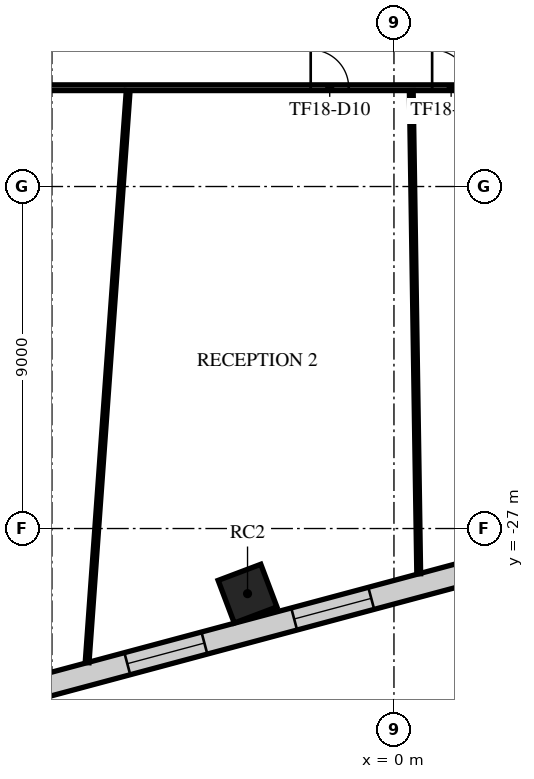
"""IFC4 building model, lengths in metres.
Left out: names, types, materials, properties, quantities, classifications, styles, units other than length and angle.
Written with IfcOpenShell. Run it as: python <this file> out.ifc"""

import sys

from ifc_helpers import new_model, si_unit, direction, frame, frame_2d, origin, origin_2d, place, context, subcontext, project, spatial, rectangle, extrude, element, fill, save


model = new_model("IFC4")
c1 = context("Model", 3, precision=1e-05, world=origin(), true_north=direction((0.0, 1.0)))
c2 = subcontext(c1, "Body", "Model", "MODEL_VIEW")
j1 = project(units=[si_unit("LENGTHUNIT", "METRE"), si_unit("PLANEANGLEUNIT", "RADIAN")], contexts=[c1])
p1 = place(None, origin())
s1 = spatial("IfcSite", under=j1, at=p1, CompositionType="ELEMENT")
p2 = place(p1, origin())
s2 = spatial("IfcBuilding", under=s1, at=p2, CompositionType="ELEMENT")
p3 = place(p2, frame((0.0, 0.0, 82.1)))
s3 = spatial("IfcBuildingStorey", under=s2, at=p3, CompositionType="ELEMENT", Elevation=82.1)
p4 = place(p3, frame((-3.853, -28.714, -0.42), z_axis=(0.0, 0.0, 1.0), x_axis=(0.935491525991, 0.353349125935, 0.0)))
e1 = element("IfcColumn", 1, at=p4, inside=s3, PredefinedType="COLUMN", context=c2, shape_type="SweptSolid", body=[
    extrude(rectangle(XDim=1.2, YDim=1.2, at=origin_2d()), origin(), (0.0, 0.0, 1.0), 4.42),
])
p5 = place(p3, frame((-16.859, -33.195, 0.0), z_axis=(0.0, 0.0, 1.0), x_axis=(0.965925643605, 0.258819726887, 0.0)))
e2 = element("IfcWall", 2, at=p5, inside=s3, PredefinedType="STANDARD", context=c2, shape_type="SweptSolid", body=[
    extrude(rectangle(XDim=49.752, YDim=0.6, at=frame_2d((24.876, 0.0))), origin(), (0.0, 0.0, 1.0), 3.58),
])
p6 = place(p5, frame((1.161, 0.0, 0.9)))
e3 = element("IfcOpeningElement", 3, at=p6, cuts=e2, PredefinedType="OPENING", context=c2, shape_type="SweptSolid", body=[
    extrude(rectangle(XDim=2.1, YDim=2.1, at=frame_2d((1.05, 1.05))), frame((0.0, 0.31, 0.0), z_axis=(0.0, -1.0, 0.0), x_axis=(1.0, 0.0, 0.0)), (0.0, 0.0, 1.0), 0.62),
])
p7 = place(p5, frame((5.644, 0.0, 0.9)))
e4 = element("IfcOpeningElement", 4, at=p7, cuts=e2, PredefinedType="OPENING", context=c2, shape_type="SweptSolid", body=[
    extrude(rectangle(XDim=2.1, YDim=2.1, at=frame_2d((1.05, 1.05))), frame((0.0, 0.31, 0.0), z_axis=(0.0, -1.0, 0.0), x_axis=(1.0, 0.0, 0.0)), (0.0, 0.0, 1.0), 0.62),
])
p8 = place(p5, frame((10.189, 0.0, 0.9)))
e5 = element("IfcOpeningElement", 5, at=p8, cuts=e2, PredefinedType="OPENING", context=c2, shape_type="SweptSolid", body=[
    extrude(rectangle(XDim=2.1, YDim=2.1, at=frame_2d((1.05, 1.05))), frame((0.0, 0.31, 0.0), z_axis=(0.0, -1.0, 0.0), x_axis=(1.0, 0.0, 0.0)), (0.0, 0.0, 1.0), 0.62),
])
p9 = place(p5, frame((14.735, 0.0, 0.9)))
e6 = element("IfcOpeningElement", 6, at=p9, cuts=e2, PredefinedType="OPENING", context=c2, shape_type="SweptSolid", body=[
    extrude(rectangle(XDim=2.1, YDim=2.1, at=frame_2d((1.05, 1.05))), frame((0.0, 0.31, 0.0), z_axis=(0.0, -1.0, 0.0), x_axis=(1.0, 0.0, 0.0)), (0.0, 0.0, 1.0), 0.62),
])
p10 = place(p5, frame((19.28, 0.0, 0.9)))
e7 = element("IfcOpeningElement", 7, at=p10, cuts=e2, PredefinedType="OPENING", context=c2, shape_type="SweptSolid", body=[
    extrude(rectangle(XDim=2.1, YDim=2.1, at=frame_2d((1.05, 1.05))), frame((0.0, 0.31, 0.0), z_axis=(0.0, -1.0, 0.0), x_axis=(1.0, 0.0, 0.0)), (0.0, 0.0, 1.0), 0.62),
])
p11 = place(p5, frame((23.826, 0.0, 0.9)))
e8 = element("IfcOpeningElement", 8, at=p11, cuts=e2, PredefinedType="OPENING", context=c2, shape_type="SweptSolid", body=[
    extrude(rectangle(XDim=2.1, YDim=2.1, at=frame_2d((1.05, 1.05))), frame((0.0, 0.31, 0.0), z_axis=(0.0, -1.0, 0.0), x_axis=(1.0, 0.0, 0.0)), (0.0, 0.0, 1.0), 0.62),
])
p12 = place(p5, frame((28.371, 0.0, 0.9)))
e9 = element("IfcOpeningElement", 9, at=p12, cuts=e2, PredefinedType="OPENING", context=c2, shape_type="SweptSolid", body=[
    extrude(rectangle(XDim=2.1, YDim=2.1, at=frame_2d((1.05, 1.05))), frame((0.0, 0.31, 0.0), z_axis=(0.0, -1.0, 0.0), x_axis=(1.0, 0.0, 0.0)), (0.0, 0.0, 1.0), 0.62),
])
p13 = place(p5, frame((32.917, 0.0, 0.9)))
e10 = element("IfcOpeningElement", 10, at=p13, cuts=e2, PredefinedType="OPENING", context=c2, shape_type="SweptSolid", body=[
    extrude(rectangle(XDim=2.1, YDim=2.1, at=frame_2d((1.05, 1.05))), frame((0.0, 0.31, 0.0), z_axis=(0.0, -1.0, 0.0), x_axis=(1.0, 0.0, 0.0)), (0.0, 0.0, 1.0), 0.62),
])
p14 = place(p5, frame((37.462, 0.0, 0.9)))
e11 = element("IfcOpeningElement", 11, at=p14, cuts=e2, PredefinedType="OPENING", context=c2, shape_type="SweptSolid", body=[
    extrude(rectangle(XDim=2.1, YDim=2.1, at=frame_2d((1.05, 1.05))), frame((0.0, 0.31, 0.0), z_axis=(0.0, -1.0, 0.0), x_axis=(1.0, 0.0, 0.0)), (0.0, 0.0, 1.0), 0.62),
])
p15 = place(p5, frame((42.008, 0.0, 0.9)))
e12 = element("IfcOpeningElement", 12, at=p15, cuts=e2, PredefinedType="OPENING", context=c2, shape_type="SweptSolid", body=[
    extrude(rectangle(XDim=2.1, YDim=2.1, at=frame_2d((1.05, 1.05))), frame((0.0, 0.31, 0.0), z_axis=(0.0, -1.0, 0.0), x_axis=(1.0, 0.0, 0.0)), (0.0, 0.0, 1.0), 0.62),
])
p16 = place(p5, frame((46.491, 0.0, 0.9)))
e13 = element("IfcOpeningElement", 13, at=p16, cuts=e2, PredefinedType="OPENING", context=c2, shape_type="SweptSolid", body=[
    extrude(rectangle(XDim=2.1, YDim=2.1, at=frame_2d((1.05, 1.05))), frame((0.0, 0.31, 0.0), z_axis=(0.0, -1.0, 0.0), x_axis=(1.0, 0.0, 0.0)), (0.0, 0.0, 1.0), 0.62),
])
p17 = place(p3, frame((-15.325, -15.4, 0.0), z_axis=(0.0, 0.0, 1.0), x_axis=(1.0, 0.0, 0.0)))
e14 = element("IfcWall", 14, at=p17, inside=s3, PredefinedType="PARTITIONING", context=c2, shape_type="SweptSolid", body=[
    extrude(rectangle(XDim=30.725, YDim=0.15, at=frame_2d((15.362, 0.0))), origin(), (0.0, 0.0, 1.0), 3.08),
])
p18 = place(p17, frame((1.8, 0.0, 0.0)))
e15 = element("IfcOpeningElement", 15, at=p18, cuts=e14, PredefinedType="OPENING", context=c2, shape_type="SweptSolid", body=[
    extrude(rectangle(XDim=1.8, YDim=2.1, at=frame_2d((0.9, 1.05))), frame((0.0, 0.085, 0.0), z_axis=(0.0, -1.0, 0.0), x_axis=(1.0, 0.0, 0.0)), (0.0, 0.0, 1.0), 0.17),
])
p19 = place(p17, frame((13.134, 0.0, 0.0)))
e16 = element("IfcOpeningElement", 16, at=p19, cuts=e14, PredefinedType="OPENING", context=c2, shape_type="SweptSolid", body=[
    extrude(rectangle(XDim=1.0, YDim=2.1, at=frame_2d((0.5, 1.05))), frame((0.0, 0.085, 0.0), z_axis=(0.0, -1.0, 0.0), x_axis=(1.0, 0.0, 0.0)), (0.0, 0.0, 1.0), 0.17),
])
p20 = place(p17, frame((16.329, 0.0, 0.0)))
e17 = element("IfcOpeningElement", 17, at=p20, cuts=e14, PredefinedType="OPENING", context=c2, shape_type="SweptSolid", body=[
    extrude(rectangle(XDim=1.0, YDim=2.1, at=frame_2d((0.5, 1.05))), frame((0.0, 0.085, 0.0), z_axis=(0.0, -1.0, 0.0), x_axis=(1.0, 0.0, 0.0)), (0.0, 0.0, 1.0), 0.17),
])
p21 = place(p17, frame((24.208, 0.0, 0.0)))
e18 = element("IfcOpeningElement", 18, at=p21, cuts=e14, PredefinedType="OPENING", context=c2, shape_type="SweptSolid", body=[
    extrude(rectangle(XDim=1.0, YDim=2.1, at=frame_2d((0.5, 1.05))), frame((0.0, 0.085, 0.0), z_axis=(0.0, -1.0, 0.0), x_axis=(1.0, 0.0, 0.0)), (0.0, 0.0, 1.0), 0.17),
])
p22 = place(p3, frame((-8.074, -30.528, 0.0), z_axis=(0.0, 0.0, 1.0), x_axis=(0.071616164184, 0.997432265885, 0.0)))
e19 = element("IfcWall", 19, at=p22, inside=s3, PredefinedType="PARTITIONING", context=c2, shape_type="SweptSolid", body=[
    extrude(rectangle(XDim=15.088, YDim=0.1, at=frame_2d((7.544, 0.0))), origin(), (0.0, 0.0, 1.0), 3.58),
])
p23 = place(p3, frame((0.455, -15.476, 0.0), z_axis=(0.0, 0.0, 1.0), x_axis=(0.015436837746, -0.999880844921, 0.0)))
e20 = element("IfcWall", 20, at=p23, inside=s3, PredefinedType="PARTITIONING", context=c2, shape_type="SweptSolid", body=[
    extrude(rectangle(XDim=12.716, YDim=0.1, at=frame_2d((6.358, 0.0))), origin(), (0.0, 0.0, 1.0), 3.58),
])
p24 = place(p8, origin())
e21 = element("IfcWindow", 21, at=p24, inside=s3, PartitioningType="SINGLE_PANEL", PredefinedType="WINDOW", context=c2, shape_type="SweptSolid", body=[
    extrude(rectangle(XDim=2.1, YDim=2.1, at=frame_2d((1.05, 1.05))), frame((0.0, 0.03, 0.0), z_axis=(0.0, -1.0, 0.0), x_axis=(1.0, 0.0, 0.0)), (0.0, 0.0, 1.0), 0.06),
])
fill(e5, e21)
p25 = place(p9, origin())
e22 = element("IfcWindow", 22, at=p25, inside=s3, PartitioningType="SINGLE_PANEL", PredefinedType="WINDOW", context=c2, shape_type="SweptSolid", body=[
    extrude(rectangle(XDim=2.1, YDim=2.1, at=frame_2d((1.05, 1.05))), frame((0.0, 0.03, 0.0), z_axis=(0.0, -1.0, 0.0), x_axis=(1.0, 0.0, 0.0)), (0.0, 0.0, 1.0), 0.06),
])
fill(e6, e22)
p26 = place(p19, frame((1.0, 0.0, 0.0), z_axis=(0.0, 0.0, 1.0), x_axis=(-1.0, 0.0, 0.0)))
e23 = element("IfcDoor", 23, at=p26, inside=s3, OperationType="SINGLE_SWING_LEFT", PredefinedType="DOOR", context=c2, shape_type="SweptSolid", body=[
    extrude(rectangle(XDim=1.0, YDim=2.1, at=frame_2d((0.5, 1.05))), frame((0.0, 0.025, 0.0), z_axis=(0.0, -1.0, 0.0), x_axis=(1.0, 0.0, 0.0)), (0.0, 0.0, 1.0), 0.05),
])
fill(e16, e23)
p27 = place(p20, frame((1.0, 0.0, 0.0), z_axis=(0.0, 0.0, 1.0), x_axis=(-1.0, 0.0, 0.0)))
e24 = element("IfcDoor", 24, at=p27, inside=s3, OperationType="SINGLE_SWING_RIGHT", PredefinedType="DOOR", context=c2, shape_type="SweptSolid", body=[
    extrude(rectangle(XDim=1.0, YDim=2.1, at=frame_2d((0.5, 1.05))), frame((0.0, 0.025, 0.0), z_axis=(0.0, -1.0, 0.0), x_axis=(1.0, 0.0, 0.0)), (0.0, 0.0, 1.0), 0.05),
])
fill(e17, e24)
save(model, sys.argv[1])
